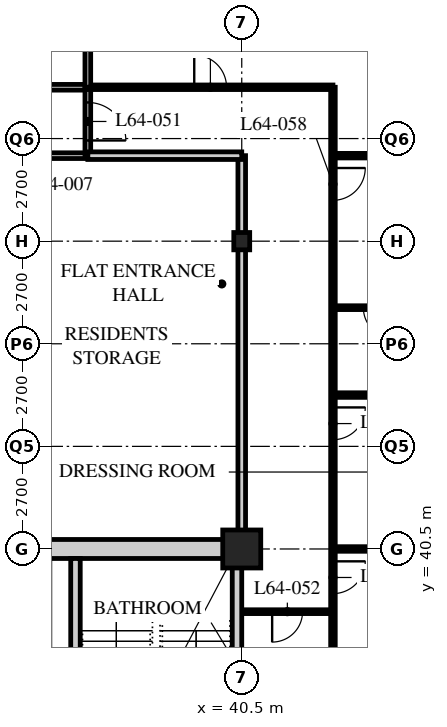
"""IFC4 building model, lengths in metres.
Left out: names, types, materials, properties, quantities, classifications, styles, units other than length and angle.
Written with IfcOpenShell. Run it as: python <this file> out.ifc"""

import sys

from ifc_helpers import new_model, si_unit, direction, frame, frame_2d, origin, origin_2d, place, context, subcontext, project, spatial, rectangle, hollow_rectangle, i_section, extrude, element, fill, save


model = new_model("IFC4")
c1 = context("Model", 3, precision=1e-05, world=origin(), true_north=direction((0.0, 1.0)))
c2 = subcontext(c1, "Body", "Model", "MODEL_VIEW")
j1 = project(units=[si_unit("LENGTHUNIT", "METRE"), si_unit("PLANEANGLEUNIT", "RADIAN")], contexts=[c1])
p1 = place(None, origin())
s1 = spatial("IfcSite", under=j1, at=p1, CompositionType="ELEMENT")
p2 = place(p1, origin())
s2 = spatial("IfcBuilding", under=s1, at=p2, CompositionType="ELEMENT")
p3 = place(p2, frame((0.0, 0.0, 250.2)))
s3 = spatial("IfcBuildingStorey", under=s2, at=p3, CompositionType="ELEMENT", Elevation=250.2)
p4 = place(p3, frame((40.5, 40.5, 0.0), z_axis=(0.0, 0.0, 1.0), x_axis=(1.0, 0.0, 0.0)))
e1 = element("IfcColumn", 1, at=p4, inside=s3, PredefinedType="COLUMN", context=c2, shape_type="SweptSolid", body=[
    extrude(hollow_rectangle(XDim=1.0, YDim=1.0, WallThickness=0.1, at=origin_2d()), origin(), (0.0, 0.0, 1.0), 3.9),
])
p5 = place(p3, frame((40.5, 48.6, 0.0), z_axis=(0.0, 0.0, 1.0), x_axis=(1.0, 0.0, 0.0)))
e2 = element("IfcColumn", 2, at=p5, inside=s3, PredefinedType="COLUMN", context=c2, shape_type="SweptSolid", body=[
    extrude(i_section(OverallWidth=0.418, OverallDepth=0.456, WebThickness=0.042, FlangeThickness=0.067, FilletRadius=0.015, at=origin_2d()), origin(), (0.0, 0.0, 1.0), 3.9),
])
p6 = place(p3, frame((12.15, 52.65, 0.0), z_axis=(0.0, 0.0, 1.0), x_axis=(1.0, 0.0, 0.0)))
e3 = element("IfcWall", 3, at=p6, inside=s3, PredefinedType="PARTITIONING", context=c2, shape_type="SweptSolid", body=[
    extrude(rectangle(XDim=24.3, YDim=0.15, at=frame_2d((12.15, 0.0))), origin(), (0.0, 0.0, 1.0), 3.69),
])
p7 = place(p6, frame((4.45, 0.0, 0.0)))
e4 = element("IfcOpeningElement", 4, at=p7, cuts=e3, PredefinedType="OPENING", context=c2, shape_type="SweptSolid", body=[
    extrude(rectangle(XDim=1.0, YDim=2.1, at=frame_2d((0.5, 1.05))), frame((0.0, 0.085, 0.0), z_axis=(0.0, -1.0, 0.0), x_axis=(1.0, 0.0, 0.0)), (0.0, 0.0, 1.0), 0.17),
])
p8 = place(p6, frame((1.525, 0.0, 0.0)))
e5 = element("IfcOpeningElement", 5, at=p8, cuts=e3, PredefinedType="OPENING", context=c2, shape_type="SweptSolid", body=[
    extrude(rectangle(XDim=1.0, YDim=2.1, at=frame_2d((0.5, 1.05))), frame((0.0, 0.085, 0.0), z_axis=(0.0, -1.0, 0.0), x_axis=(1.0, 0.0, 0.0)), (0.0, 0.0, 1.0), 0.17),
])
p9 = place(p3, frame((29.56, 50.85, 0.0), z_axis=(0.0, 0.0, 1.0), x_axis=(1.0, 0.0, 0.0)))
e6 = element("IfcWall", 6, at=p9, inside=s3, PredefinedType="PARTITIONING", context=c2, shape_type="SweptSolid", body=[
    extrude(rectangle(XDim=6.89, YDim=0.15, at=frame_2d((3.445, 0.0))), origin(), (0.0, 0.0, 1.0), 3.69),
])
p10 = place(p9, frame((0.657, 0.0, 0.0)))
e7 = element("IfcOpeningElement", 7, at=p10, cuts=e6, PredefinedType="OPENING", context=c2, shape_type="SweptSolid", body=[
    extrude(rectangle(XDim=1.0, YDim=2.1, at=frame_2d((0.5, 1.05))), frame((0.0, 0.085, 0.0), z_axis=(0.0, -1.0, 0.0), x_axis=(1.0, 0.0, 0.0)), (0.0, 0.0, 1.0), 0.17),
])
p11 = place(p9, frame((2.84, 0.0, 0.0)))
e8 = element("IfcOpeningElement", 8, at=p11, cuts=e6, PredefinedType="OPENING", context=c2, shape_type="SweptSolid", body=[
    extrude(rectangle(XDim=1.0, YDim=2.1, at=frame_2d((0.5, 1.05))), frame((0.0, 0.085, 0.0), z_axis=(0.0, -1.0, 0.0), x_axis=(1.0, 0.0, 0.0)), (0.0, 0.0, 1.0), 0.17),
])
p12 = place(p9, frame((4.873, 0.0, 0.0)))
e9 = element("IfcOpeningElement", 9, at=p12, cuts=e6, PredefinedType="OPENING", context=c2, shape_type="SweptSolid", body=[
    extrude(rectangle(XDim=1.0, YDim=2.1, at=frame_2d((0.5, 1.05))), frame((0.0, 0.085, 0.0), z_axis=(0.0, -1.0, 0.0), x_axis=(1.0, 0.0, 0.0)), (0.0, 0.0, 1.0), 0.17),
])
p13 = place(p3, frame((36.45, 50.85, 0.0), z_axis=(0.0, 0.0, 1.0), x_axis=(0.0, 1.0, 0.0)))
e10 = element("IfcWall", 10, at=p13, inside=s3, PredefinedType="PARTITIONING", context=c2, shape_type="SweptSolid", body=[
    extrude(rectangle(XDim=1.8, YDim=0.15, at=frame_2d((0.9, 0.0))), origin(), (0.0, 0.0, 1.0), 3.69),
])
p14 = place(p13, frame((0.4, 0.0, 0.0)))
e11 = element("IfcOpeningElement", 11, at=p14, cuts=e10, PredefinedType="OPENING", context=c2, shape_type="SweptSolid", body=[
    extrude(rectangle(XDim=1.0, YDim=2.1, at=frame_2d((0.5, 1.05))), frame((0.0, 0.085, 0.0), z_axis=(0.0, -1.0, 0.0), x_axis=(1.0, 0.0, 0.0)), (0.0, 0.0, 1.0), 0.17),
])
p15 = place(p3, frame((40.5, 40.5, 0.0), z_axis=(0.0, 0.0, 1.0), x_axis=(0.0, 1.0, 0.0)))
e12 = element("IfcWall", 12, at=p15, inside=s3, PredefinedType="SOLIDWALL", context=c2, shape_type="SweptSolid", body=[
    extrude(rectangle(XDim=10.35, YDim=0.2, at=frame_2d((5.175, 0.0))), origin(), (0.0, 0.0, 1.0), 3.078),
])
p16 = place(p3, frame((40.5, 38.85, 0.0), z_axis=(0.0, 0.0, 1.0), x_axis=(1.0, 0.0, 0.0)))
e13 = element("IfcWall", 13, at=p16, inside=s3, PredefinedType="PARTITIONING", context=c2, shape_type="SweptSolid", body=[
    extrude(rectangle(XDim=2.4, YDim=0.1, at=frame_2d((1.2, 0.0))), origin(), (0.0, 0.0, 1.0), 3.69),
])
p17 = place(p16, frame((0.8, 0.0, 0.0)))
e14 = element("IfcOpeningElement", 14, at=p17, cuts=e13, PredefinedType="OPENING", context=c2, shape_type="SweptSolid", body=[
    extrude(rectangle(XDim=0.8, YDim=2.1, at=frame_2d((0.4, 1.05))), frame((0.0, 0.06, 0.0), z_axis=(0.0, -1.0, 0.0), x_axis=(1.0, 0.0, 0.0)), (0.0, 0.0, 1.0), 0.12),
])
p18 = place(p3, frame((42.9, 52.65, 0.0), z_axis=(0.0, 0.0, 1.0), x_axis=(0.0, -1.0, 0.0)))
e15 = element("IfcWall", 15, at=p18, inside=s3, PredefinedType="PARTITIONING", context=c2, shape_type="SweptSolid", body=[
    extrude(rectangle(XDim=16.2, YDim=0.12, at=frame_2d((8.1, 0.0))), origin(), (0.0, 0.0, 1.0), 3.69),
])
p19 = place(p18, frame((2.125, 0.0, 0.0)))
e16 = element("IfcOpeningElement", 16, at=p19, cuts=e15, PredefinedType="OPENING", context=c2, shape_type="SweptSolid", body=[
    extrude(rectangle(XDim=0.85, YDim=2.1, at=frame_2d((0.425, 1.05))), frame((0.0, 0.07, 0.0), z_axis=(0.0, -1.0, 0.0), x_axis=(1.0, 0.0, 0.0)), (0.0, 0.0, 1.0), 0.14),
])
p20 = place(p18, frame((8.425, 0.0, 0.0)))
e17 = element("IfcOpeningElement", 17, at=p20, cuts=e15, PredefinedType="OPENING", context=c2, shape_type="SweptSolid", body=[
    extrude(rectangle(XDim=0.85, YDim=2.1, at=frame_2d((0.425, 1.05))), frame((0.0, 0.07, 0.0), z_axis=(0.0, -1.0, 0.0), x_axis=(1.0, 0.0, 0.0)), (0.0, 0.0, 1.0), 0.14),
])
p21 = place(p18, frame((12.475, 0.0, 0.0)))
e18 = element("IfcOpeningElement", 18, at=p21, cuts=e15, PredefinedType="OPENING", context=c2, shape_type="SweptSolid", body=[
    extrude(rectangle(XDim=0.85, YDim=2.1, at=frame_2d((0.425, 1.05))), frame((0.0, 0.07, 0.0), z_axis=(0.0, -1.0, 0.0), x_axis=(1.0, 0.0, 0.0)), (0.0, 0.0, 1.0), 0.14),
])
p22 = place(p3, frame((36.45, 52.65, 0.0), z_axis=(0.0, 0.0, 1.0), x_axis=(1.0, 0.0, 0.0)))
e19 = element("IfcWall", 19, at=p22, inside=s3, PredefinedType="PARTITIONING", context=c2, shape_type="SweptSolid", body=[
    extrude(rectangle(XDim=6.45, YDim=0.12, at=frame_2d((3.225, 0.0))), origin(), (0.0, 0.0, 1.0), 3.69),
])
p23 = place(p22, frame((2.8, 0.0, 0.0)))
e20 = element("IfcOpeningElement", 20, at=p23, cuts=e19, PredefinedType="OPENING", context=c2, shape_type="SweptSolid", body=[
    extrude(rectangle(XDim=0.85, YDim=2.1, at=frame_2d((0.425, 1.05))), frame((0.0, 0.07, 0.0), z_axis=(0.0, -1.0, 0.0), x_axis=(1.0, 0.0, 0.0)), (0.0, 0.0, 1.0), 0.14),
])
p24 = place(p3, frame((36.45, 50.85, 0.0), z_axis=(0.0, 0.0, 1.0), x_axis=(1.0, 0.0, 0.0)))
e21 = element("IfcWall", 21, at=p24, inside=s3, PredefinedType="SOLIDWALL", context=c2, shape_type="SweptSolid", body=[
    extrude(rectangle(XDim=4.05, YDim=0.2, at=frame_2d((2.025, 0.0))), origin(), (0.0, 0.0, 1.0), 3.69),
])
p25 = place(p3, frame((42.9, 50.85, 0.0), z_axis=(0.0, 0.0, 1.0), x_axis=(1.0, 0.0, 0.0)))
e22 = element("IfcWall", 22, at=p25, inside=s3, PredefinedType="PARTITIONING", context=c2, shape_type="SweptSolid", body=[
    extrude(rectangle(XDim=13.5, YDim=0.12, at=frame_2d((6.75, 0.0))), origin(), (0.0, 0.0, 1.0), 3.69),
])
p26 = place(p3, frame((36.45, 64.5, 0.0), z_axis=(0.0, 0.0, 1.0), x_axis=(0.0, -1.0, 0.0)))
e23 = element("IfcWall", 23, at=p26, inside=s3, PredefinedType="PARTITIONING", context=c2, shape_type="SweptSolid", body=[
    extrude(rectangle(XDim=11.85, YDim=0.15, at=frame_2d((5.925, 0.0))), origin(), (0.0, 0.0, 1.0), 3.69),
])
p27 = place(p3, frame((42.9, 46.85, 0.0), z_axis=(0.0, 0.0, 1.0), x_axis=(1.0, 0.0, 0.0)))
e24 = element("IfcWall", 24, at=p27, inside=s3, PredefinedType="PARTITIONING", context=c2, shape_type="SweptSolid", body=[
    extrude(rectangle(XDim=2.4, YDim=0.1, at=frame_2d((1.2, 0.0))), origin(), (0.0, 0.0, 1.0), 3.69),
])
p28 = place(p27, frame((0.8, 0.0, 0.0)))
e25 = element("IfcOpeningElement", 25, at=p28, cuts=e24, PredefinedType="OPENING", context=c2, shape_type="SweptSolid", body=[
    extrude(rectangle(XDim=0.8, YDim=2.1, at=frame_2d((0.4, 1.05))), frame((0.0, 0.06, 0.0), z_axis=(0.0, -1.0, 0.0), x_axis=(1.0, 0.0, 0.0)), (0.0, 0.0, 1.0), 0.12),
])
p29 = place(p3, frame((42.9, 44.55, 0.0), z_axis=(0.0, 0.0, 1.0), x_axis=(1.0, 0.0, 0.0)))
e26 = element("IfcWall", 26, at=p29, inside=s3, PredefinedType="PARTITIONING", context=c2, shape_type="SweptSolid", body=[
    extrude(rectangle(XDim=13.5, YDim=0.12, at=frame_2d((6.75, 0.0))), origin(), (0.0, 0.0, 1.0), 3.69),
])
p30 = place(p3, frame((42.9, 40.5, 0.0), z_axis=(0.0, 0.0, 1.0), x_axis=(1.0, 0.0, 0.0)))
e27 = element("IfcWall", 27, at=p30, inside=s3, PredefinedType="PARTITIONING", context=c2, shape_type="SweptSolid", body=[
    extrude(rectangle(XDim=13.5, YDim=0.12, at=frame_2d((6.75, 0.0))), origin(), (0.0, 0.0, 1.0), 3.078),
])
p31 = place(p3, frame((15.95, 40.5, 0.0), z_axis=(0.0, 0.0, 1.0), x_axis=(1.0, 0.0, 0.0)))
e28 = element("IfcWall", 28, at=p31, inside=s3, PredefinedType="SOLIDWALL", context=c2, shape_type="SweptSolid", body=[
    extrude(rectangle(XDim=24.55, YDim=0.5, at=frame_2d((12.275, 0.0))), origin(), (0.0, 0.0, 1.0), 3.04),
])
p32 = place(p31, frame((11.5, 0.0, 0.0)))
e29 = element("IfcOpeningElement", 29, at=p32, cuts=e28, PredefinedType="OPENING", context=c2, shape_type="SweptSolid", body=[
    extrude(rectangle(XDim=1.8, YDim=2.4, at=frame_2d((0.9, 1.2))), frame((0.0, 0.26, 0.0), z_axis=(0.0, -1.0, 0.0), x_axis=(1.0, 0.0, 0.0)), (0.0, 0.0, 1.0), 0.52),
])
p33 = place(p3, frame((40.375, 24.55, 0.0), z_axis=(0.0, 0.0, 1.0), x_axis=(0.0, 1.0, 0.0)))
e30 = element("IfcWall", 30, at=p33, inside=s3, PredefinedType="SOLIDWALL", context=c2, shape_type="SweptSolid", body=[
    extrude(rectangle(XDim=15.7, YDim=0.25, at=frame_2d((7.85, 0.0))), origin(), (0.0, 0.0, 1.0), 3.078),
])
p34 = place(p3, frame((36.125, 32.5, 0.0), z_axis=(0.0, 0.0, 1.0), x_axis=(0.0, 1.0, 0.0)))
e31 = element("IfcWall", 31, at=p34, inside=s3, PredefinedType="SOLIDWALL", context=c2, shape_type="SweptSolid", body=[
    extrude(rectangle(XDim=7.75, YDim=0.25, at=frame_2d((3.875, 0.0))), origin(), (0.0, 0.0, 1.0), 3.69),
])
p35 = place(p34, frame((0.45, 0.0, 0.0)))
e32 = element("IfcOpeningElement", 32, at=p35, cuts=e31, PredefinedType="OPENING", context=c2, shape_type="SweptSolid", body=[
    extrude(rectangle(XDim=1.2, YDim=2.1, at=frame_2d((0.6, 1.05))), frame((0.0, 0.135, 0.0), z_axis=(0.0, -1.0, 0.0), x_axis=(1.0, 0.0, 0.0)), (0.0, 0.0, 1.0), 0.27),
])
p36 = place(p14, origin())
e33 = element("IfcDoor", 33, at=p36, inside=s3, OperationType="SINGLE_SWING_RIGHT", PredefinedType="DOOR", context=c2, shape_type="SweptSolid", body=[
    extrude(rectangle(XDim=1.0, YDim=2.1, at=frame_2d((0.5, 1.05))), frame((0.0, 0.025, 0.0), z_axis=(0.0, -1.0, 0.0), x_axis=(1.0, 0.0, 0.0)), (0.0, 0.0, 1.0), 0.05),
])
fill(e11, e33)
p37 = place(p17, origin())
e34 = element("IfcDoor", 34, at=p37, inside=s3, OperationType="SINGLE_SWING_RIGHT", PredefinedType="DOOR", context=c2, shape_type="SweptSolid", body=[
    extrude(rectangle(XDim=0.8, YDim=2.1, at=frame_2d((0.4, 1.05))), frame((0.0, 0.025, 0.0), z_axis=(0.0, -1.0, 0.0), x_axis=(1.0, 0.0, 0.0)), (0.0, 0.0, 1.0), 0.05),
])
fill(e14, e34)
p38 = place(p23, origin())
e35 = element("IfcDoor", 35, at=p38, inside=s3, OperationType="SINGLE_SWING_LEFT", PredefinedType="DOOR", context=c2, shape_type="SweptSolid", body=[
    extrude(rectangle(XDim=0.85, YDim=2.1, at=frame_2d((0.425, 1.05))), frame((0.0, 0.025, 0.0), z_axis=(0.0, -1.0, 0.0), x_axis=(1.0, 0.0, 0.0)), (0.0, 0.0, 1.0), 0.05),
])
fill(e20, e35)
p39 = place(p28, origin())
e36 = element("IfcDoor", 36, at=p39, inside=s3, OperationType="SINGLE_SWING_LEFT", PredefinedType="DOOR", context=c2, shape_type="SweptSolid", body=[
    extrude(rectangle(XDim=0.8, YDim=2.1, at=frame_2d((0.4, 1.05))), frame((0.0, 0.025, 0.0), z_axis=(0.0, -1.0, 0.0), x_axis=(1.0, 0.0, 0.0)), (0.0, 0.0, 1.0), 0.05),
])
fill(e25, e36)
p40 = place(p19, origin())
e37 = element("IfcDoor", 37, at=p40, inside=s3, OperationType="SINGLE_SWING_LEFT", PredefinedType="DOOR", context=c2, shape_type="SweptSolid", body=[
    extrude(rectangle(XDim=0.85, YDim=2.1, at=frame_2d((0.425, 1.05))), frame((0.0, 0.025, 0.0), z_axis=(0.0, -1.0, 0.0), x_axis=(1.0, 0.0, 0.0)), (0.0, 0.0, 1.0), 0.05),
])
fill(e16, e37)
p41 = place(p20, origin())
e38 = element("IfcDoor", 38, at=p41, inside=s3, OperationType="SINGLE_SWING_LEFT", PredefinedType="DOOR", context=c2, shape_type="SweptSolid", body=[
    extrude(rectangle(XDim=0.85, YDim=2.1, at=frame_2d((0.425, 1.05))), frame((0.0, 0.025, 0.0), z_axis=(0.0, -1.0, 0.0), x_axis=(1.0, 0.0, 0.0)), (0.0, 0.0, 1.0), 0.05),
])
fill(e17, e38)
p42 = place(p21, origin())
e39 = element("IfcDoor", 39, at=p42, inside=s3, OperationType="SINGLE_SWING_LEFT", PredefinedType="DOOR", context=c2, shape_type="SweptSolid", body=[
    extrude(rectangle(XDim=0.85, YDim=2.1, at=frame_2d((0.425, 1.05))), frame((0.0, 0.025, 0.0), z_axis=(0.0, -1.0, 0.0), x_axis=(1.0, 0.0, 0.0)), (0.0, 0.0, 1.0), 0.05),
])
fill(e18, e39)
save(model, sys.argv[1])
